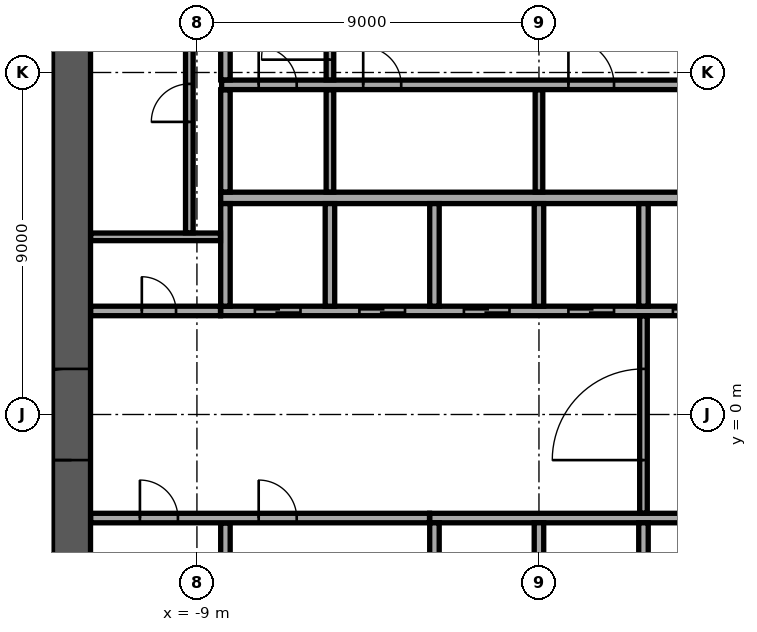
"""IFC4 building model, lengths in metres.
Left out: names, types, materials, properties, quantities, classifications, styles, units other than length and angle.
Written with IfcOpenShell. Run it as: python <this file> out.ifc"""

import sys

from ifc_helpers import new_model, si_unit, direction, frame, frame_2d, origin, place, context, subcontext, project, spatial, rectangle, extrude, element, fill, save


model = new_model("IFC4")
c1 = context("Model", 3, precision=1e-05, world=origin(), true_north=direction((0.0, 1.0)))
c2 = subcontext(c1, "Body", "Model", "MODEL_VIEW")
j1 = project(units=[si_unit("LENGTHUNIT", "METRE"), si_unit("PLANEANGLEUNIT", "RADIAN")], contexts=[c1])
p1 = place(None, origin())
s1 = spatial("IfcSite", under=j1, at=p1, CompositionType="ELEMENT")
p2 = place(p1, origin())
s2 = spatial("IfcBuilding", under=s1, at=p2, CompositionType="ELEMENT")
p3 = place(p2, frame((0.0, 0.0, 135.7)))
s3 = spatial("IfcBuildingStorey", under=s2, at=p3, CompositionType="ELEMENT", Elevation=135.7)
p4 = place(p3, frame((-12.3, -11.8, 0.0), z_axis=(0.0, 0.0, 1.0), x_axis=(0.0, 1.0, 0.0)))
e1 = element("IfcWall", 1, at=p4, inside=s3, PredefinedType="SHEAR", context=c2, shape_type="SweptSolid", body=[
    extrude(rectangle(XDim=23.6, YDim=1.0, at=frame_2d((11.8, 0.0))), origin(), (0.0, 0.0, 1.0), 3.6),
])
p5 = place(p4, frame((10.6, 0.0, 0.0)))
e2 = element("IfcOpeningElement", 2, at=p5, cuts=e1, PredefinedType="OPENING", context=c2, shape_type="SweptSolid", body=[
    extrude(rectangle(XDim=2.4, YDim=2.4, at=frame_2d((1.2, 1.2))), frame((0.0, 0.51, 0.0), z_axis=(0.0, -1.0, 0.0), x_axis=(1.0, 0.0, 0.0)), (0.0, 0.0, 1.0), 1.02),
])
p6 = place(p3, frame((-8.375, 5.7, 0.0), z_axis=(0.0, 0.0, 1.0), x_axis=(1.0, 0.0, 0.0)))
e3 = element("IfcWall", 3, at=p6, inside=s3, PredefinedType="SOLIDWALL", context=c2, shape_type="SweptSolid", body=[
    extrude(rectangle(XDim=16.75, YDim=0.3, at=frame_2d((8.375, 0.0))), origin(), (0.0, 0.0, 1.0), 3.6),
])
p7 = place(p3, frame((-8.375, 2.725, 0.0), z_axis=(0.0, 0.0, 1.0), x_axis=(1.0, 0.0, 0.0)))
e4 = element("IfcWall", 4, at=p7, inside=s3, PredefinedType="SOLIDWALL", context=c2, shape_type="SweptSolid", body=[
    extrude(rectangle(XDim=16.75, YDim=0.25, at=frame_2d((8.375, 0.0))), origin(), (0.0, 0.0, 1.0), 3.6),
])
p8 = place(p7, frame((0.9, 0.0, 0.0)))
e5 = element("IfcOpeningElement", 5, at=p8, cuts=e4, PredefinedType="OPENING", context=c2, shape_type="SweptSolid", body=[
    extrude(rectangle(XDim=1.2, YDim=2.1, at=frame_2d((0.6, 1.05))), frame((0.0, 0.135, 0.0), z_axis=(0.0, -1.0, 0.0), x_axis=(1.0, 0.0, 0.0)), (0.0, 0.0, 1.0), 0.27),
])
p9 = place(p7, frame((3.65, 0.0, 0.0)))
e6 = element("IfcOpeningElement", 6, at=p9, cuts=e4, PredefinedType="OPENING", context=c2, shape_type="SweptSolid", body=[
    extrude(rectangle(XDim=1.2, YDim=2.1, at=frame_2d((0.6, 1.05))), frame((0.0, 0.135, 0.0), z_axis=(0.0, -1.0, 0.0), x_axis=(1.0, 0.0, 0.0)), (0.0, 0.0, 1.0), 0.27),
])
p10 = place(p7, frame((6.4, 0.0, 0.0)))
e7 = element("IfcOpeningElement", 7, at=p10, cuts=e4, PredefinedType="OPENING", context=c2, shape_type="SweptSolid", body=[
    extrude(rectangle(XDim=1.2, YDim=2.1, at=frame_2d((0.6, 1.05))), frame((0.0, 0.135, 0.0), z_axis=(0.0, -1.0, 0.0), x_axis=(1.0, 0.0, 0.0)), (0.0, 0.0, 1.0), 0.27),
])
p11 = place(p7, frame((9.15, 0.0, 0.0)))
e8 = element("IfcOpeningElement", 8, at=p11, cuts=e4, PredefinedType="OPENING", context=c2, shape_type="SweptSolid", body=[
    extrude(rectangle(XDim=1.2, YDim=2.1, at=frame_2d((0.6, 1.05))), frame((0.0, 0.135, 0.0), z_axis=(0.0, -1.0, 0.0), x_axis=(1.0, 0.0, 0.0)), (0.0, 0.0, 1.0), 0.27),
])
p12 = place(p7, frame((11.9, 0.0, 0.0)))
e9 = element("IfcOpeningElement", 9, at=p12, cuts=e4, PredefinedType="OPENING", context=c2, shape_type="SweptSolid", body=[
    extrude(rectangle(XDim=1.2, YDim=2.1, at=frame_2d((0.6, 1.05))), frame((0.0, 0.135, 0.0), z_axis=(0.0, -1.0, 0.0), x_axis=(1.0, 0.0, 0.0)), (0.0, 0.0, 1.0), 0.27),
])
p13 = place(p7, frame((14.65, 0.0, 0.0)))
e10 = element("IfcOpeningElement", 10, at=p13, cuts=e4, PredefinedType="OPENING", context=c2, shape_type="SweptSolid", body=[
    extrude(rectangle(XDim=1.2, YDim=2.1, at=frame_2d((0.6, 1.05))), frame((0.0, 0.135, 0.0), z_axis=(0.0, -1.0, 0.0), x_axis=(1.0, 0.0, 0.0)), (0.0, 0.0, 1.0), 0.27),
])
for number, where, z_axis, x_axis in (
    (11, (-8.25, 2.85, 0.0), (0.0, 0.0, 1.0), (0.0, 1.0, 0.0)),
    (12, (-5.5, 2.85, 0.0), (0.0, 0.0, 1.0), (0.0, 1.0, 0.0)),
    (13, (-2.75, 2.85, 0.0), (0.0, 0.0, 1.0), (0.0, 1.0, 0.0)),
    (14, (0.0, 2.85, 0.0), (0.0, 0.0, 1.0), (0.0, 1.0, 0.0)),
    (15, (2.75, 2.85, 0.0), (0.0, 0.0, 1.0), (0.0, 1.0, 0.0)),
):
    element("IfcWall", number, at=place(p3, frame(where, z_axis=z_axis, x_axis=x_axis)), inside=s3, PredefinedType="SOLIDWALL", context=c2, shape_type="SweptSolid", body=[
        extrude(rectangle(XDim=2.7, YDim=0.25, at=frame_2d((1.35, 0.0))), origin(), (0.0, 0.0, 1.0), 3.6),
    ])
p14 = place(p3, frame((-2.875, -2.725, 0.0), z_axis=(0.0, 0.0, 1.0), x_axis=(1.0, 0.0, 0.0)))
e16 = element("IfcWall", 16, at=p14, inside=s3, PredefinedType="SOLIDWALL", context=c2, shape_type="SweptSolid", body=[
    extrude(rectangle(XDim=8.5, YDim=0.25, at=frame_2d((4.25, 0.0))), origin(), (0.0, 0.0, 1.0), 3.6),
])
for number, where, z_axis, x_axis in (
    (17, (-2.75, -5.55, 0.0), (0.0, 0.0, 1.0), (0.0, 1.0, 0.0)),
    (18, (0.0, -5.55, 0.0), (0.0, 0.0, 1.0), (0.0, 1.0, 0.0)),
    (19, (2.75, -5.55, 0.0), (0.0, 0.0, 1.0), (0.0, 1.0, 0.0)),
):
    element("IfcWall", number, at=place(p3, frame(where, z_axis=z_axis, x_axis=x_axis)), inside=s3, PredefinedType="SOLIDWALL", context=c2, shape_type="SweptSolid", body=[
        extrude(rectangle(XDim=2.7, YDim=0.25, at=frame_2d((1.35, 0.0))), origin(), (0.0, 0.0, 1.0), 3.6),
    ])
p15 = place(p3, frame((-8.25, -5.545, 0.0), z_axis=(0.0, 0.0, 1.0), x_axis=(0.0, 1.0, 0.0)))
e20 = element("IfcWall", 20, at=p15, inside=s3, PredefinedType="PARTITIONING", context=c2, shape_type="SweptSolid", body=[
    extrude(rectangle(XDim=2.69, YDim=0.25, at=frame_2d((1.345, 0.0))), origin(), (0.0, 0.0, 1.0), 3.6),
])
p16 = place(p3, frame((-11.795, -2.725, 0.0), z_axis=(0.0, 0.0, 1.0), x_axis=(1.0, 0.0, 0.0)))
e21 = element("IfcWall", 21, at=p16, inside=s3, PredefinedType="PARTITIONING", context=c2, shape_type="SweptSolid", body=[
    extrude(rectangle(XDim=8.915, YDim=0.25, at=frame_2d((4.458, 0.0))), origin(), (0.0, 0.0, 1.0), 3.6),
])
p17 = place(p16, frame((1.295, 0.0, 0.0)))
e22 = element("IfcOpeningElement", 22, at=p17, cuts=e21, PredefinedType="OPENING", context=c2, shape_type="SweptSolid", body=[
    extrude(rectangle(XDim=1.0, YDim=2.1, at=frame_2d((0.5, 1.05))), frame((0.0, 0.135, 0.0), z_axis=(0.0, -1.0, 0.0), x_axis=(1.0, 0.0, 0.0)), (0.0, 0.0, 1.0), 0.27),
])
p18 = place(p16, frame((4.42, 0.0, 0.0)))
e23 = element("IfcOpeningElement", 23, at=p18, cuts=e21, PredefinedType="OPENING", context=c2, shape_type="SweptSolid", body=[
    extrude(rectangle(XDim=1.0, YDim=2.1, at=frame_2d((0.5, 1.05))), frame((0.0, 0.135, 0.0), z_axis=(0.0, -1.0, 0.0), x_axis=(1.0, 0.0, 0.0)), (0.0, 0.0, 1.0), 0.27),
])
p19 = place(p3, frame((2.75, -2.595, 0.0), z_axis=(0.0, 0.0, 1.0), x_axis=(0.0, 1.0, 0.0)))
e24 = element("IfcWall", 24, at=p19, inside=s3, PredefinedType="PARTITIONING", context=c2, shape_type="SweptSolid", body=[
    extrude(rectangle(XDim=5.19, YDim=0.2, at=frame_2d((2.595, 0.0))), origin(), (0.0, 0.0, 1.0), 3.6),
])
p20 = place(p19, frame((1.395, 0.0, 0.0)))
e25 = element("IfcOpeningElement", 25, at=p20, cuts=e24, PredefinedType="OPENING", context=c2, shape_type="SweptSolid", body=[
    extrude(rectangle(XDim=2.4, YDim=2.4, at=frame_2d((1.2, 1.2))), frame((0.0, 0.11, 0.0), z_axis=(0.0, -1.0, 0.0), x_axis=(1.0, 0.0, 0.0)), (0.0, 0.0, 1.0), 0.22),
])
p21 = place(p3, frame((-11.795, 2.725, 0.0), z_axis=(0.0, 0.0, 1.0), x_axis=(1.0, 0.0, 0.0)))
e26 = element("IfcWall", 26, at=p21, inside=s3, PredefinedType="PARTITIONING", context=c2, shape_type="SweptSolid", body=[
    extrude(rectangle(XDim=3.415, YDim=0.25, at=frame_2d((1.708, 0.0))), origin(), (0.0, 0.0, 1.0), 3.6),
])
p22 = place(p21, frame((1.345, 0.0, 0.0)))
e27 = element("IfcOpeningElement", 27, at=p22, cuts=e26, PredefinedType="OPENING", context=c2, shape_type="SweptSolid", body=[
    extrude(rectangle(XDim=0.9, YDim=2.1, at=frame_2d((0.45, 1.05))), frame((0.0, 0.135, 0.0), z_axis=(0.0, -1.0, 0.0), x_axis=(1.0, 0.0, 0.0)), (0.0, 0.0, 1.0), 0.27),
])
p23 = place(p3, frame((-11.795, 4.675, 0.0), z_axis=(0.0, 0.0, 1.0), x_axis=(1.0, 0.0, 0.0)))
e28 = element("IfcWall", 28, at=p23, inside=s3, PredefinedType="PARTITIONING", context=c2, shape_type="SweptSolid", body=[
    extrude(rectangle(XDim=3.415, YDim=0.2, at=frame_2d((1.708, 0.0))), origin(), (0.0, 0.0, 1.0), 3.6),
])
p24 = place(p3, frame((-9.2, 4.78, 0.0), z_axis=(0.0, 0.0, 1.0), x_axis=(0.0, 1.0, 0.0)))
e29 = element("IfcWall", 29, at=p24, inside=s3, PredefinedType="PARTITIONING", context=c2, shape_type="SweptSolid", body=[
    extrude(rectangle(XDim=7.015, YDim=0.2, at=frame_2d((3.507, 0.0))), origin(), (0.0, 0.0, 1.0), 3.6),
])
p25 = place(p24, frame((2.92, 0.0, 0.0)))
e30 = element("IfcOpeningElement", 30, at=p25, cuts=e29, PredefinedType="OPENING", context=c2, shape_type="SweptSolid", body=[
    extrude(rectangle(XDim=1.0, YDim=2.1, at=frame_2d((0.5, 1.05))), frame((0.0, 0.11, 0.0), z_axis=(0.0, -1.0, 0.0), x_axis=(1.0, 0.0, 0.0)), (0.0, 0.0, 1.0), 0.22),
])
p26 = place(p3, frame((-8.25, 5.855, 0.0), z_axis=(0.0, 0.0, 1.0), x_axis=(0.0, 1.0, 0.0)))
e31 = element("IfcWall", 31, at=p26, inside=s3, PredefinedType="PARTITIONING", context=c2, shape_type="SweptSolid", body=[
    extrude(rectangle(XDim=2.69, YDim=0.25, at=frame_2d((1.345, 0.0))), origin(), (0.0, 0.0, 1.0), 3.6),
])
for number, where, z_axis, x_axis in (
    (32, (-5.5, 5.855, 0.0), (0.0, 0.0, 1.0), (0.0, 1.0, 0.0)),
    (33, (0.0, 5.855, 0.0), (0.0, 0.0, 1.0), (0.0, 1.0, 0.0)),
):
    element("IfcWall", number, at=place(p3, frame(where, z_axis=z_axis, x_axis=x_axis)), inside=s3, PredefinedType="PARTITIONING", context=c2, shape_type="SweptSolid", body=[
        extrude(rectangle(XDim=2.69, YDim=0.2, at=frame_2d((1.345, 0.0))), origin(), (0.0, 0.0, 1.0), 3.6),
    ])
p27 = place(p3, frame((-8.35, 8.675, 0.0), z_axis=(0.0, 0.0, 1.0), x_axis=(1.0, 0.0, 0.0)))
e34 = element("IfcWall", 34, at=p27, inside=s3, PredefinedType="PARTITIONING", context=c2, shape_type="SweptSolid", body=[
    extrude(rectangle(XDim=16.72, YDim=0.25, at=frame_2d((8.36, 0.0))), origin(), (0.0, 0.0, 1.0), 3.6),
])
p28 = place(p27, frame((0.975, 0.0, 0.0)))
e35 = element("IfcOpeningElement", 35, at=p28, cuts=e34, PredefinedType="OPENING", context=c2, shape_type="SweptSolid", body=[
    extrude(rectangle(XDim=1.0, YDim=2.1, at=frame_2d((0.5, 1.05))), frame((0.0, 0.135, 0.0), z_axis=(0.0, -1.0, 0.0), x_axis=(1.0, 0.0, 0.0)), (0.0, 0.0, 1.0), 0.27),
])
p29 = place(p27, frame((3.725, 0.0, 0.0)))
e36 = element("IfcOpeningElement", 36, at=p29, cuts=e34, PredefinedType="OPENING", context=c2, shape_type="SweptSolid", body=[
    extrude(rectangle(XDim=1.0, YDim=2.1, at=frame_2d((0.5, 1.05))), frame((0.0, 0.135, 0.0), z_axis=(0.0, -1.0, 0.0), x_axis=(1.0, 0.0, 0.0)), (0.0, 0.0, 1.0), 0.27),
])
p30 = place(p27, frame((9.125, 0.0, 0.0)))
e37 = element("IfcOpeningElement", 37, at=p30, cuts=e34, PredefinedType="OPENING", context=c2, shape_type="SweptSolid", body=[
    extrude(rectangle(XDim=1.2, YDim=2.1, at=frame_2d((0.6, 1.05))), frame((0.0, 0.135, 0.0), z_axis=(0.0, -1.0, 0.0), x_axis=(1.0, 0.0, 0.0)), (0.0, 0.0, 1.0), 0.27),
])
p31 = place(p3, frame((-8.25, 8.805, 0.0), z_axis=(0.0, 0.0, 1.0), x_axis=(0.0, 1.0, 0.0)))
e38 = element("IfcWall", 38, at=p31, inside=s3, PredefinedType="PARTITIONING", context=c2, shape_type="SweptSolid", body=[
    extrude(rectangle(XDim=2.99, YDim=0.25, at=frame_2d((1.495, 0.0))), origin(), (0.0, 0.0, 1.0), 3.6),
])
p32 = place(p31, frame((0.895, 0.0, 0.0)))
e39 = element("IfcOpeningElement", 39, at=p32, cuts=e38, PredefinedType="OPENING", context=c2, shape_type="SweptSolid", body=[
    extrude(rectangle(XDim=1.0, YDim=2.1, at=frame_2d((0.5, 1.05))), frame((0.0, 0.135, 0.0), z_axis=(0.0, -1.0, 0.0), x_axis=(1.0, 0.0, 0.0)), (0.0, 0.0, 1.0), 0.27),
])
p33 = place(p3, frame((-5.5, 8.805, 0.0), z_axis=(0.0, 0.0, 1.0), x_axis=(0.0, 1.0, 0.0)))
e40 = element("IfcWall", 40, at=p33, inside=s3, PredefinedType="PARTITIONING", context=c2, shape_type="SweptSolid", body=[
    extrude(rectangle(XDim=2.99, YDim=0.2, at=frame_2d((1.495, 0.0))), origin(), (0.0, 0.0, 1.0), 3.6),
])
p34 = place(p33, frame((0.532, 0.0, 0.0)))
e41 = element("IfcOpeningElement", 41, at=p34, cuts=e40, PredefinedType="OPENING", context=c2, shape_type="SweptSolid", body=[
    extrude(rectangle(XDim=1.8, YDim=2.1, at=frame_2d((0.9, 1.05))), frame((0.0, 0.11, 0.0), z_axis=(0.0, -1.0, 0.0), x_axis=(1.0, 0.0, 0.0)), (0.0, 0.0, 1.0), 0.22),
])
p35 = place(p3, frame((-23.187, 9.123, 0.0), z_axis=(0.0, 0.0, 1.0), x_axis=(0.874618419846, 0.484811942578, 0.0)))
e42 = element("IfcWall", 42, at=p35, inside=s3, PredefinedType="PARTITIONING", context=c2, shape_type="SweptSolid", body=[
    extrude(rectangle(XDim=31.713, YDim=0.15, at=frame_2d((15.857, 0.0))), origin(), (0.0, 0.0, 1.0), 3.15),
])
p36 = place(p35, frame((11.252, 0.0, 0.0)))
e43 = element("IfcOpeningElement", 43, at=p36, cuts=e42, PredefinedType="OPENING", context=c2, shape_type="SweptSolid", body=[
    extrude(rectangle(XDim=1.0, YDim=2.1, at=frame_2d((0.5, 1.05))), frame((0.0, 0.085, 0.0), z_axis=(0.0, -1.0, 0.0), x_axis=(1.0, 0.0, 0.0)), (0.0, 0.0, 1.0), 0.17),
])
p37 = place(p35, frame((19.896, 0.0, 0.0)))
e44 = element("IfcOpeningElement", 44, at=p37, cuts=e42, PredefinedType="OPENING", context=c2, shape_type="SweptSolid", body=[
    extrude(rectangle(XDim=1.0, YDim=2.1, at=frame_2d((0.5, 1.05))), frame((0.0, 0.085, 0.0), z_axis=(0.0, -1.0, 0.0), x_axis=(1.0, 0.0, 0.0)), (0.0, 0.0, 1.0), 0.17),
])
p38 = place(p35, frame((29.223, 0.0, 0.0)))
e45 = element("IfcOpeningElement", 45, at=p38, cuts=e42, PredefinedType="OPENING", context=c2, shape_type="SweptSolid", body=[
    extrude(rectangle(XDim=1.0, YDim=2.1, at=frame_2d((0.5, 1.05))), frame((0.0, 0.085, 0.0), z_axis=(0.0, -1.0, 0.0), x_axis=(1.0, 0.0, 0.0)), (0.0, 0.0, 1.0), 0.17),
])
p39 = place(p5, origin())
e46 = element("IfcDoor", 46, at=p39, inside=s3, OperationType="SINGLE_SWING_LEFT", PredefinedType="DOOR", context=c2, shape_type="SweptSolid", body=[
    extrude(rectangle(XDim=2.4, YDim=2.4, at=frame_2d((1.2, 1.2))), frame((0.0, 0.025, 0.0), z_axis=(0.0, -1.0, 0.0), x_axis=(1.0, 0.0, 0.0)), (0.0, 0.0, 1.0), 0.05),
])
fill(e2, e46)
p40 = place(p8, origin())
e47 = element("IfcDoor", 47, at=p40, inside=s3, OperationType="DOUBLE_DOOR_SLIDING", PredefinedType="DOOR", context=c2, shape_type="SweptSolid", body=[
    extrude(rectangle(XDim=1.2, YDim=2.1, at=frame_2d((0.6, 1.05))), frame((0.0, 0.025, 0.0), z_axis=(0.0, -1.0, 0.0), x_axis=(1.0, 0.0, 0.0)), (0.0, 0.0, 1.0), 0.05),
])
fill(e5, e47)
p41 = place(p9, origin())
e48 = element("IfcDoor", 48, at=p41, inside=s3, OperationType="DOUBLE_DOOR_SLIDING", PredefinedType="DOOR", context=c2, shape_type="SweptSolid", body=[
    extrude(rectangle(XDim=1.2, YDim=2.1, at=frame_2d((0.6, 1.05))), frame((0.0, 0.025, 0.0), z_axis=(0.0, -1.0, 0.0), x_axis=(1.0, 0.0, 0.0)), (0.0, 0.0, 1.0), 0.05),
])
fill(e6, e48)
p42 = place(p10, origin())
e49 = element("IfcDoor", 49, at=p42, inside=s3, OperationType="DOUBLE_DOOR_SLIDING", PredefinedType="DOOR", context=c2, shape_type="SweptSolid", body=[
    extrude(rectangle(XDim=1.2, YDim=2.1, at=frame_2d((0.6, 1.05))), frame((0.0, 0.025, 0.0), z_axis=(0.0, -1.0, 0.0), x_axis=(1.0, 0.0, 0.0)), (0.0, 0.0, 1.0), 0.05),
])
fill(e7, e49)
p43 = place(p11, origin())
e50 = element("IfcDoor", 50, at=p43, inside=s3, OperationType="DOUBLE_DOOR_SLIDING", PredefinedType="DOOR", context=c2, shape_type="SweptSolid", body=[
    extrude(rectangle(XDim=1.2, YDim=2.1, at=frame_2d((0.6, 1.05))), frame((0.0, 0.025, 0.0), z_axis=(0.0, -1.0, 0.0), x_axis=(1.0, 0.0, 0.0)), (0.0, 0.0, 1.0), 0.05),
])
fill(e8, e50)
p44 = place(p12, origin())
e51 = element("IfcDoor", 51, at=p44, inside=s3, OperationType="DOUBLE_DOOR_SLIDING", PredefinedType="DOOR", context=c2, shape_type="SweptSolid", body=[
    extrude(rectangle(XDim=1.2, YDim=2.1, at=frame_2d((0.6, 1.05))), frame((0.0, 0.025, 0.0), z_axis=(0.0, -1.0, 0.0), x_axis=(1.0, 0.0, 0.0)), (0.0, 0.0, 1.0), 0.05),
])
fill(e9, e51)
p45 = place(p17, origin())
e52 = element("IfcDoor", 52, at=p45, inside=s3, OperationType="SINGLE_SWING_RIGHT", PredefinedType="DOOR", context=c2, shape_type="SweptSolid", body=[
    extrude(rectangle(XDim=1.0, YDim=2.1, at=frame_2d((0.5, 1.05))), frame((0.0, 0.025, 0.0), z_axis=(0.0, -1.0, 0.0), x_axis=(1.0, 0.0, 0.0)), (0.0, 0.0, 1.0), 0.05),
])
fill(e22, e52)
p46 = place(p22, origin())
e53 = element("IfcDoor", 53, at=p46, inside=s3, OperationType="SINGLE_SWING_RIGHT", PredefinedType="DOOR", context=c2, shape_type="SweptSolid", body=[
    extrude(rectangle(XDim=0.9, YDim=2.1, at=frame_2d((0.45, 1.05))), frame((0.0, 0.025, 0.0), z_axis=(0.0, -1.0, 0.0), x_axis=(1.0, 0.0, 0.0)), (0.0, 0.0, 1.0), 0.05),
])
fill(e27, e53)
p47 = place(p25, origin())
e54 = element("IfcDoor", 54, at=p47, inside=s3, OperationType="SINGLE_SWING_RIGHT", PredefinedType="DOOR", context=c2, shape_type="SweptSolid", body=[
    extrude(rectangle(XDim=1.0, YDim=2.1, at=frame_2d((0.5, 1.05))), frame((0.0, 0.025, 0.0), z_axis=(0.0, -1.0, 0.0), x_axis=(1.0, 0.0, 0.0)), (0.0, 0.0, 1.0), 0.05),
])
fill(e30, e54)
p48 = place(p28, origin())
e55 = element("IfcDoor", 55, at=p48, inside=s3, OperationType="SINGLE_SWING_RIGHT", PredefinedType="DOOR", context=c2, shape_type="SweptSolid", body=[
    extrude(rectangle(XDim=1.0, YDim=2.1, at=frame_2d((0.5, 1.05))), frame((0.0, 0.025, 0.0), z_axis=(0.0, -1.0, 0.0), x_axis=(1.0, 0.0, 0.0)), (0.0, 0.0, 1.0), 0.05),
])
fill(e35, e55)
p49 = place(p29, origin())
e56 = element("IfcDoor", 56, at=p49, inside=s3, OperationType="SINGLE_SWING_RIGHT", PredefinedType="DOOR", context=c2, shape_type="SweptSolid", body=[
    extrude(rectangle(XDim=1.0, YDim=2.1, at=frame_2d((0.5, 1.05))), frame((0.0, 0.025, 0.0), z_axis=(0.0, -1.0, 0.0), x_axis=(1.0, 0.0, 0.0)), (0.0, 0.0, 1.0), 0.05),
])
fill(e36, e56)
p50 = place(p30, origin())
e57 = element("IfcDoor", 57, at=p50, inside=s3, OperationType="SINGLE_SWING_LEFT", PredefinedType="DOOR", context=c2, shape_type="SweptSolid", body=[
    extrude(rectangle(XDim=1.2, YDim=2.1, at=frame_2d((0.6, 1.05))), frame((0.0, 0.025, 0.0), z_axis=(0.0, -1.0, 0.0), x_axis=(1.0, 0.0, 0.0)), (0.0, 0.0, 1.0), 0.05),
])
fill(e37, e57)
p51 = place(p18, origin())
e58 = element("IfcDoor", 58, at=p51, inside=s3, OperationType="SINGLE_SWING_RIGHT", PredefinedType="DOOR", context=c2, shape_type="SweptSolid", body=[
    extrude(rectangle(XDim=1.0, YDim=2.1, at=frame_2d((0.5, 1.05))), frame((0.0, 0.025, 0.0), z_axis=(0.0, -1.0, 0.0), x_axis=(1.0, 0.0, 0.0)), (0.0, 0.0, 1.0), 0.05),
])
fill(e23, e58)
p52 = place(p20, origin())
e59 = element("IfcDoor", 59, at=p52, inside=s3, OperationType="DOUBLE_DOOR_DOUBLE_SWING", PredefinedType="DOOR", context=c2, shape_type="SweptSolid", body=[
    extrude(rectangle(XDim=2.4, YDim=2.4, at=frame_2d((1.2, 1.2))), frame((0.0, 0.025, 0.0), z_axis=(0.0, -1.0, 0.0), x_axis=(1.0, 0.0, 0.0)), (0.0, 0.0, 1.0), 0.05),
])
fill(e25, e59)
p53 = place(p34, origin())
e60 = element("IfcDoor", 60, at=p53, inside=s3, OperationType="SINGLE_SWING_LEFT", PredefinedType="DOOR", context=c2, shape_type="SweptSolid", body=[
    extrude(rectangle(XDim=1.8, YDim=2.1, at=frame_2d((0.9, 1.05))), frame((0.0, 0.025, 0.0), z_axis=(0.0, -1.0, 0.0), x_axis=(1.0, 0.0, 0.0)), (0.0, 0.0, 1.0), 0.05),
])
fill(e41, e60)
save(model, sys.argv[1])
